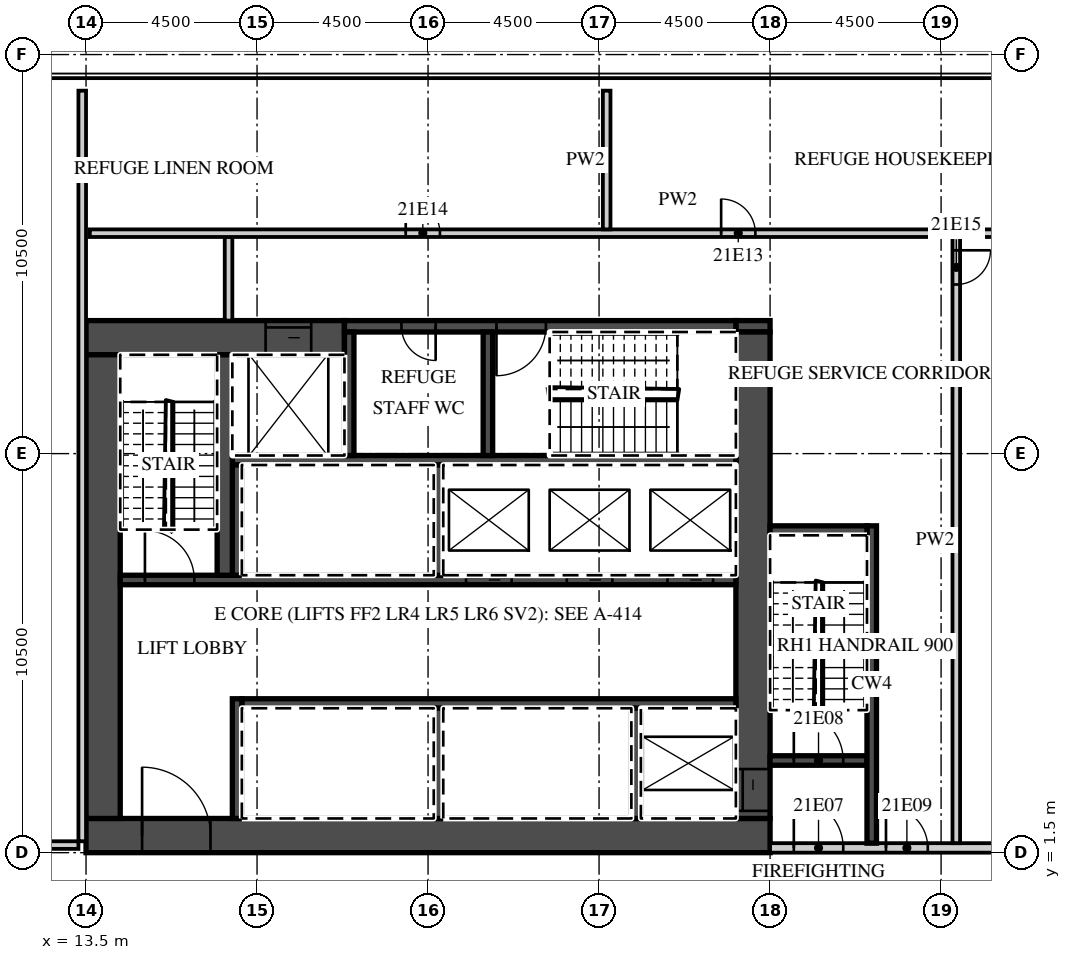
"""IFC4 building model, lengths in metres.
Left out: names, types, materials, properties, quantities, classifications, styles, units other than length and angle.
Written with IfcOpenShell. Run it as: python <this file> out.ifc"""

import sys

from ifc_helpers import new_model, si_unit, direction, frame, frame_2d, origin, place, context, subcontext, project, spatial, rectangle, extrude, element, fill, save


model = new_model("IFC4")
c1 = context("Model", 3, precision=1e-05, world=origin(), true_north=direction((0.0, 1.0)))
c2 = subcontext(c1, "Body", "Model", "MODEL_VIEW")
j1 = project(units=[si_unit("LENGTHUNIT", "METRE"), si_unit("PLANEANGLEUNIT", "RADIAN")], contexts=[c1])
p1 = place(None, origin())
s1 = spatial("IfcSite", under=j1, at=p1, CompositionType="ELEMENT")
p2 = place(p1, origin())
s2 = spatial("IfcBuilding", under=s1, at=p2, CompositionType="ELEMENT")
p3 = place(p2, frame((0.0, 0.0, 99.6)))
s3 = spatial("IfcBuildingStorey", under=s2, at=p3, CompositionType="ELEMENT", Elevation=99.6)
p4 = place(p3, frame((13.5, 1.95, 0.0), z_axis=(0.0, 0.0, 1.0), x_axis=(1.0, 0.0, 0.0)))
e1 = element("IfcWall", 1, at=p4, inside=s3, PredefinedType="SHEAR", context=c2, shape_type="SweptSolid", body=[
    extrude(rectangle(XDim=18.0, YDim=0.9, at=frame_2d((9.0, 0.0))), origin(), (0.0, 0.0, 1.0), 4.2),
])
p5 = place(p4, frame((1.475, 0.0, 0.0)))
e2 = element("IfcOpeningElement", 2, at=p5, cuts=e1, PredefinedType="OPENING", context=c2, shape_type="SweptSolid", body=[
    extrude(rectangle(XDim=1.8, YDim=2.1, at=frame_2d((0.9, 1.05))), frame((0.0, 0.46, 0.0), z_axis=(0.0, -1.0, 0.0), x_axis=(1.0, 0.0, 0.0)), (0.0, 0.0, 1.0), 0.92),
])
p6 = place(p3, frame((13.5, 15.05, 0.0), z_axis=(0.0, 0.0, 1.0), x_axis=(1.0, 0.0, 0.0)))
e3 = element("IfcWall", 3, at=p6, inside=s3, PredefinedType="SHEAR", context=c2, shape_type="SweptSolid", body=[
    extrude(rectangle(XDim=6.8, YDim=0.9, at=frame_2d((3.4, 0.0))), origin(), (0.0, 0.0, 1.0), 4.2),
])
p7 = place(p6, frame((4.725, 0.0, 0.0)))
e4 = element("IfcOpeningElement", 4, at=p7, cuts=e3, PredefinedType="OPENING", context=c2, shape_type="SweptSolid", body=[
    extrude(rectangle(XDim=1.2, YDim=2.1, at=frame_2d((0.6, 1.05))), frame((0.0, 0.46, 0.0), z_axis=(0.0, -1.0, 0.0), x_axis=(1.0, 0.0, 0.0)), (0.0, 0.0, 1.0), 0.92),
])
p8 = place(p3, frame((30.6, 15.35, 0.0), z_axis=(0.0, 0.0, 1.0), x_axis=(1.0, 0.0, 0.0)))
e5 = element("IfcWall", 5, at=p8, inside=s3, PredefinedType="SHEAR", context=c2, shape_type="SweptSolid", body=[
    extrude(rectangle(XDim=0.9, YDim=0.3, at=frame_2d((0.45, 0.0))), origin(), (0.0, 0.0, 1.0), 4.2),
])
p9 = place(p3, frame((20.3, 15.35, 0.0), z_axis=(0.0, 0.0, 1.0), x_axis=(1.0, 0.0, 0.0)))
e6 = element("IfcWall", 6, at=p9, inside=s3, PredefinedType="SHEAR", context=c2, shape_type="SweptSolid", body=[
    extrude(rectangle(XDim=10.3, YDim=0.3, at=frame_2d((5.15, 0.0))), origin(), (0.0, 0.0, 1.0), 4.2),
])
p10 = place(p9, frame((4.0, 0.0, 0.0)))
e7 = element("IfcOpeningElement", 7, at=p10, cuts=e6, PredefinedType="OPENING", context=c2, shape_type="SweptSolid", body=[
    extrude(rectangle(XDim=1.3, YDim=2.1, at=frame_2d((0.65, 1.05))), frame((0.0, 0.16, 0.0), z_axis=(0.0, -1.0, 0.0), x_axis=(1.0, 0.0, 0.0)), (0.0, 0.0, 1.0), 0.32),
])
p11 = place(p9, frame((1.5, 0.0, 0.0)))
e8 = element("IfcOpeningElement", 8, at=p11, cuts=e6, PredefinedType="OPENING", context=c2, shape_type="SweptSolid", body=[
    extrude(rectangle(XDim=0.9, YDim=2.1, at=frame_2d((0.45, 1.05))), frame((0.0, 0.16, 0.0), z_axis=(0.0, -1.0, 0.0), x_axis=(1.0, 0.0, 0.0)), (0.0, 0.0, 1.0), 0.32),
])
p12 = place(p3, frame((31.05, 2.4, 0.0), z_axis=(0.0, 0.0, 1.0), x_axis=(0.0, 1.0, 0.0)))
e9 = element("IfcWall", 9, at=p12, inside=s3, PredefinedType="SHEAR", context=c2, shape_type="SweptSolid", body=[
    extrude(rectangle(XDim=12.8, YDim=0.9, at=frame_2d((6.4, 0.0))), origin(), (0.0, 0.0, 1.0), 4.2),
])
p13 = place(p12, frame((0.2, 0.0, 0.0)))
e10 = element("IfcOpeningElement", 10, at=p13, cuts=e9, PredefinedType="OPENING", context=c2, shape_type="SweptSolid", body=[
    extrude(rectangle(XDim=1.1, YDim=2.1, at=frame_2d((0.55, 1.05))), frame((0.0, 0.46, 0.0), z_axis=(0.0, -1.0, 0.0), x_axis=(1.0, 0.0, 0.0)), (0.0, 0.0, 1.0), 0.92),
])
p14 = place(p3, frame((13.95, 2.4, 0.0), z_axis=(0.0, 0.0, 1.0), x_axis=(0.0, 1.0, 0.0)))
e11 = element("IfcWall", 11, at=p14, inside=s3, PredefinedType="SHEAR", context=c2, shape_type="SweptSolid", body=[
    extrude(rectangle(XDim=12.2, YDim=0.9, at=frame_2d((6.1, 0.0))), origin(), (0.0, 0.0, 1.0), 4.2),
])
p15 = place(p3, frame((17.6, 5.425, 0.0), z_axis=(0.0, 0.0, 1.0), x_axis=(1.0, 0.0, 0.0)))
e12 = element("IfcWall", 12, at=p15, inside=s3, PredefinedType="SHEAR", context=c2, shape_type="SweptSolid", body=[
    extrude(rectangle(XDim=13.0, YDim=0.25, at=frame_2d((6.5, 0.0))), origin(), (0.0, 0.0, 1.0), 4.2),
])
p16 = place(p3, frame((17.475, 2.4, 0.0), z_axis=(0.0, 0.0, 1.0), x_axis=(0.0, 1.0, 0.0)))
e13 = element("IfcWall", 13, at=p16, inside=s3, PredefinedType="SHEAR", context=c2, shape_type="SweptSolid", body=[
    extrude(rectangle(XDim=3.15, YDim=0.25, at=frame_2d((1.575, 0.0))), origin(), (0.0, 0.0, 1.0), 4.2),
])
for number, where, z_axis, x_axis in (
    (14, (27.975, 2.4, 0.0), (0.0, 0.0, 1.0), (0.0, 1.0, 0.0)),
    (15, (22.775, 2.4, 0.0), (0.0, 0.0, 1.0), (0.0, 1.0, 0.0)),
):
    element("IfcWall", number, at=place(p3, frame(where, z_axis=z_axis, x_axis=x_axis)), inside=s3, PredefinedType="SHEAR", context=c2, shape_type="SweptSolid", body=[
        extrude(rectangle(XDim=2.9, YDim=0.25, at=frame_2d((1.45, 0.0))), origin(), (0.0, 0.0, 1.0), 4.2),
    ])
p17 = place(p3, frame((14.4, 8.675, 0.0), z_axis=(0.0, 0.0, 1.0), x_axis=(1.0, 0.0, 0.0)))
e16 = element("IfcWall", 16, at=p17, inside=s3, PredefinedType="SHEAR", context=c2, shape_type="SweptSolid", body=[
    extrude(rectangle(XDim=16.2, YDim=0.25, at=frame_2d((8.1, 0.0))), origin(), (0.0, 0.0, 1.0), 4.2),
])
p18 = place(p17, frame((14.4, 0.0, 0.0)))
e17 = element("IfcOpeningElement", 17, at=p18, cuts=e16, PredefinedType="OPENING", context=c2, shape_type="SweptSolid", body=[
    extrude(rectangle(XDim=1.2, YDim=2.1, at=frame_2d((0.6, 1.05))), frame((0.0, 0.135, 0.0), z_axis=(0.0, -1.0, 0.0), x_axis=(1.0, 0.0, 0.0)), (0.0, 0.0, 1.0), 0.27),
])
p19 = place(p17, frame((11.75, 0.0, 0.0)))
e18 = element("IfcOpeningElement", 18, at=p19, cuts=e16, PredefinedType="OPENING", context=c2, shape_type="SweptSolid", body=[
    extrude(rectangle(XDim=1.2, YDim=2.1, at=frame_2d((0.6, 1.05))), frame((0.0, 0.135, 0.0), z_axis=(0.0, -1.0, 0.0), x_axis=(1.0, 0.0, 0.0)), (0.0, 0.0, 1.0), 0.27),
])
p20 = place(p17, frame((9.1, 0.0, 0.0)))
e19 = element("IfcOpeningElement", 19, at=p20, cuts=e16, PredefinedType="OPENING", context=c2, shape_type="SweptSolid", body=[
    extrude(rectangle(XDim=1.2, YDim=2.1, at=frame_2d((0.6, 1.05))), frame((0.0, 0.135, 0.0), z_axis=(0.0, -1.0, 0.0), x_axis=(1.0, 0.0, 0.0)), (0.0, 0.0, 1.0), 0.27),
])
p21 = place(p17, frame((0.65, 0.0, 0.0)))
e20 = element("IfcOpeningElement", 20, at=p21, cuts=e16, PredefinedType="OPENING", context=c2, shape_type="SweptSolid", body=[
    extrude(rectangle(XDim=1.3, YDim=2.1, at=frame_2d((0.65, 1.05))), frame((0.0, 0.135, 0.0), z_axis=(0.0, -1.0, 0.0), x_axis=(1.0, 0.0, 0.0)), (0.0, 0.0, 1.0), 0.27),
])
p22 = place(p3, frame((17.35, 11.825, 0.0), z_axis=(0.0, 0.0, 1.0), x_axis=(1.0, 0.0, 0.0)))
e21 = element("IfcWall", 21, at=p22, inside=s3, PredefinedType="SHEAR", context=c2, shape_type="SweptSolid", body=[
    extrude(rectangle(XDim=13.25, YDim=0.25, at=frame_2d((6.625, 0.0))), origin(), (0.0, 0.0, 1.0), 4.2),
])
for number, where, z_axis, x_axis in (
    (22, (17.475, 8.8, 0.0), (0.0, 0.0, 1.0), (0.0, 1.0, 0.0)),
    (23, (22.775, 8.8, 0.0), (0.0, 0.0, 1.0), (0.0, 1.0, 0.0)),
):
    element("IfcWall", number, at=place(p3, frame(where, z_axis=z_axis, x_axis=x_axis)), inside=s3, PredefinedType="SHEAR", context=c2, shape_type="SweptSolid", body=[
        extrude(rectangle(XDim=2.9, YDim=0.25, at=frame_2d((1.45, 0.0))), origin(), (0.0, 0.0, 1.0), 4.2),
    ])
p23 = place(p3, frame((17.15, 8.8, 0.0), z_axis=(0.0, 0.0, 1.0), x_axis=(0.0, 1.0, 0.0)))
e24 = element("IfcWall", 24, at=p23, inside=s3, PredefinedType="SHEAR", context=c2, shape_type="SweptSolid", body=[
    extrude(rectangle(XDim=5.8, YDim=0.4, at=frame_2d((2.9, 0.0))), origin(), (0.0, 0.0, 1.0), 4.2),
])
for number, where, z_axis, x_axis in (
    (25, (20.425, 11.95, 0.0), (0.0, 0.0, 1.0), (0.0, 1.0, 0.0)),
    (26, (24.075, 11.95, 0.0), (0.0, 0.0, 1.0), (0.0, 1.0, 0.0)),
):
    element("IfcWall", number, at=place(p3, frame(where, z_axis=z_axis, x_axis=x_axis)), inside=s3, PredefinedType="SHEAR", context=c2, shape_type="SweptSolid", body=[
        extrude(rectangle(XDim=3.25, YDim=0.25, at=frame_2d((1.625, 0.0))), origin(), (0.0, 0.0, 1.0), 4.2),
    ])
p24 = place(p3, frame((31.5, 1.625, 0.0), z_axis=(0.0, 0.0, 1.0), x_axis=(1.0, 0.0, 0.0)))
e27 = element("IfcWall", 27, at=p24, inside=s3, PredefinedType="PARTITIONING", context=c2, shape_type="SweptSolid", body=[
    extrude(rectangle(XDim=13.05, YDim=0.25, at=frame_2d((6.525, 0.0))), origin(), (0.0, 0.0, 1.0), 4.2),
])
p25 = place(p24, frame((0.625, 0.0, 0.0)))
e28 = element("IfcOpeningElement", 28, at=p25, cuts=e27, PredefinedType="OPENING", context=c2, shape_type="SweptSolid", body=[
    extrude(rectangle(XDim=1.3, YDim=2.1, at=frame_2d((0.65, 1.05))), frame((0.0, 0.135, 0.0), z_axis=(0.0, -1.0, 0.0), x_axis=(1.0, 0.0, 0.0)), (0.0, 0.0, 1.0), 0.27),
])
p26 = place(p24, frame((3.05, 0.0, 0.0)))
e29 = element("IfcOpeningElement", 29, at=p26, cuts=e27, PredefinedType="OPENING", context=c2, shape_type="SweptSolid", body=[
    extrude(rectangle(XDim=1.1, YDim=2.1, at=frame_2d((0.55, 1.05))), frame((0.0, 0.135, 0.0), z_axis=(0.0, -1.0, 0.0), x_axis=(1.0, 0.0, 0.0)), (0.0, 0.0, 1.0), 0.27),
])
p27 = place(p3, frame((31.5, 3.925, 0.0), z_axis=(0.0, 0.0, 1.0), x_axis=(1.0, 0.0, 0.0)))
e30 = element("IfcWall", 30, at=p27, inside=s3, PredefinedType="SHEAR", context=c2, shape_type="SweptSolid", body=[
    extrude(rectangle(XDim=2.55, YDim=0.25, at=frame_2d((1.275, 0.0))), origin(), (0.0, 0.0, 1.0), 4.2),
])
p28 = place(p27, frame((0.625, 0.0, 0.0)))
e31 = element("IfcOpeningElement", 31, at=p28, cuts=e30, PredefinedType="OPENING", context=c2, shape_type="SweptSolid", body=[
    extrude(rectangle(XDim=1.3, YDim=2.1, at=frame_2d((0.65, 1.05))), frame((0.0, 0.135, 0.0), z_axis=(0.0, -1.0, 0.0), x_axis=(1.0, 0.0, 0.0)), (0.0, 0.0, 1.0), 0.27),
])
p29 = place(p3, frame((34.175, 1.75, 0.0), z_axis=(0.0, 0.0, 1.0), x_axis=(0.0, 1.0, 0.0)))
e32 = element("IfcWall", 32, at=p29, inside=s3, PredefinedType="SHEAR", context=c2, shape_type="SweptSolid", body=[
    extrude(rectangle(XDim=8.35, YDim=0.25, at=frame_2d((4.175, 0.0))), origin(), (0.0, 0.0, 1.0), 4.2),
])
p30 = place(p3, frame((31.5, 9.975, 0.0), z_axis=(0.0, 0.0, 1.0), x_axis=(1.0, 0.0, 0.0)))
e33 = element("IfcWall", 33, at=p30, inside=s3, PredefinedType="SHEAR", context=c2, shape_type="SweptSolid", body=[
    extrude(rectangle(XDim=2.55, YDim=0.25, at=frame_2d((1.275, 0.0))), origin(), (0.0, 0.0, 1.0), 4.2),
])
p31 = place(p3, frame((17.25, 15.5, 0.0), z_axis=(0.0, 0.0, 1.0), x_axis=(0.0, 1.0, 0.0)))
e34 = element("IfcWall", 34, at=p31, inside=s3, PredefinedType="PARTITIONING", context=c2, shape_type="SweptSolid", body=[
    extrude(rectangle(XDim=2.2, YDim=0.2, at=frame_2d((1.1, 0.0))), origin(), (0.0, 0.0, 1.0), 4.2),
])
p32 = place(p3, frame((36.4, 1.75, 0.0), z_axis=(0.0, 0.0, 1.0), x_axis=(0.0, 1.0, 0.0)))
e35 = element("IfcWall", 35, at=p32, inside=s3, PredefinedType="PARTITIONING", context=c2, shape_type="SweptSolid", body=[
    extrude(rectangle(XDim=15.95, YDim=0.2, at=frame_2d((7.975, 0.0))), origin(), (0.0, 0.0, 1.0), 4.2),
])
p33 = place(p32, frame((14.7, 0.0, 0.0)))
e36 = element("IfcOpeningElement", 36, at=p33, cuts=e35, PredefinedType="OPENING", context=c2, shape_type="SweptSolid", body=[
    extrude(rectangle(XDim=0.9, YDim=2.1, at=frame_2d((0.45, 1.05))), frame((0.0, 0.11, 0.0), z_axis=(0.0, -1.0, 0.0), x_axis=(1.0, 0.0, 0.0)), (0.0, 0.0, 1.0), 0.22),
])
p34 = place(p3, frame((13.6, 17.8, 0.0), z_axis=(0.0, 0.0, 1.0), x_axis=(1.0, 0.0, 0.0)))
e37 = element("IfcWall", 37, at=p34, inside=s3, PredefinedType="PARTITIONING", context=c2, shape_type="SweptSolid", body=[
    extrude(rectangle(XDim=30.95, YDim=0.2, at=frame_2d((15.475, 0.0))), origin(), (0.0, 0.0, 1.0), 4.2),
])
p35 = place(p34, frame((16.613, 0.0, 0.0)))
e38 = element("IfcOpeningElement", 38, at=p35, cuts=e37, PredefinedType="OPENING", context=c2, shape_type="SweptSolid", body=[
    extrude(rectangle(XDim=0.9, YDim=2.1, at=frame_2d((0.45, 1.05))), frame((0.0, 0.11, 0.0), z_axis=(0.0, -1.0, 0.0), x_axis=(1.0, 0.0, 0.0)), (0.0, 0.0, 1.0), 0.22),
])
p36 = place(p34, frame((8.312, 0.0, 0.0)))
e39 = element("IfcOpeningElement", 39, at=p36, cuts=e37, PredefinedType="OPENING", context=c2, shape_type="SweptSolid", body=[
    extrude(rectangle(XDim=0.9, YDim=2.1, at=frame_2d((0.45, 1.05))), frame((0.0, 0.11, 0.0), z_axis=(0.0, -1.0, 0.0), x_axis=(1.0, 0.0, 0.0)), (0.0, 0.0, 1.0), 0.22),
])
p37 = place(p3, frame((27.2, 17.9, 0.0), z_axis=(0.0, 0.0, 1.0), x_axis=(0.0, 1.0, 0.0)))
e40 = element("IfcWall", 40, at=p37, inside=s3, PredefinedType="PARTITIONING", context=c2, shape_type="SweptSolid", body=[
    extrude(rectangle(XDim=3.65, YDim=0.2, at=frame_2d((1.825, 0.0))), origin(), (0.0, 0.0, 1.0), 4.2),
])
p38 = place(p3, frame((-44.55, 1.7, 0.0), z_axis=(0.0, 0.0, 1.0), x_axis=(1.0, 0.0, 0.0)))
e41 = element("IfcWall", 41, at=p38, inside=s3, PredefinedType="PARTITIONING", context=c2, shape_type="SweptSolid", body=[
    extrude(rectangle(XDim=57.85, YDim=0.2, at=frame_2d((28.925, 0.0))), origin(), (0.0, 0.0, 1.0), 4.2),
])
p39 = place(p38, frame((51.4, 0.0, 0.0)))
e42 = element("IfcOpeningElement", 42, at=p39, cuts=e41, PredefinedType="OPENING", context=c2, shape_type="SweptSolid", body=[
    extrude(rectangle(XDim=1.8, YDim=2.1, at=frame_2d((0.9, 1.05))), frame((0.0, 0.11, 0.0), z_axis=(0.0, -1.0, 0.0), x_axis=(1.0, 0.0, 0.0)), (0.0, 0.0, 1.0), 0.22),
])
p40 = place(p38, frame((45.05, 0.0, 0.0)))
e43 = element("IfcOpeningElement", 43, at=p40, cuts=e41, PredefinedType="OPENING", context=c2, shape_type="SweptSolid", body=[
    extrude(rectangle(XDim=1.0, YDim=2.1, at=frame_2d((0.5, 1.05))), frame((0.0, 0.11, 0.0), z_axis=(0.0, -1.0, 0.0), x_axis=(1.0, 0.0, 0.0)), (0.0, 0.0, 1.0), 0.22),
])
p41 = place(p38, frame((38.475, 0.0, 0.0)))
e44 = element("IfcOpeningElement", 44, at=p41, cuts=e41, PredefinedType="OPENING", context=c2, shape_type="SweptSolid", body=[
    extrude(rectangle(XDim=1.2, YDim=2.1, at=frame_2d((0.6, 1.05))), frame((0.0, 0.11, 0.0), z_axis=(0.0, -1.0, 0.0), x_axis=(1.0, 0.0, 0.0)), (0.0, 0.0, 1.0), 0.22),
])
p42 = place(p38, frame((24.41, 0.0, 0.0)))
e45 = element("IfcOpeningElement", 45, at=p42, cuts=e41, PredefinedType="OPENING", context=c2, shape_type="SweptSolid", body=[
    extrude(rectangle(XDim=1.8, YDim=2.1, at=frame_2d((0.9, 1.05))), frame((0.0, 0.11, 0.0), z_axis=(0.0, -1.0, 0.0), x_axis=(1.0, 0.0, 0.0)), (0.0, 0.0, 1.0), 0.22),
])
p43 = place(p38, frame((17.89, 0.0, 0.0)))
e46 = element("IfcOpeningElement", 46, at=p43, cuts=e41, PredefinedType="OPENING", context=c2, shape_type="SweptSolid", body=[
    extrude(rectangle(XDim=1.8, YDim=2.1, at=frame_2d((0.9, 1.05))), frame((0.0, 0.11, 0.0), z_axis=(0.0, -1.0, 0.0), x_axis=(1.0, 0.0, 0.0)), (0.0, 0.0, 1.0), 0.22),
])
p44 = place(p38, frame((5.975, 0.0, 0.0)))
e47 = element("IfcOpeningElement", 47, at=p44, cuts=e41, PredefinedType="OPENING", context=c2, shape_type="SweptSolid", body=[
    extrude(rectangle(XDim=1.0, YDim=2.1, at=frame_2d((0.5, 1.05))), frame((0.0, 0.11, 0.0), z_axis=(0.0, -1.0, 0.0), x_axis=(1.0, 0.0, 0.0)), (0.0, 0.0, 1.0), 0.22),
])
p45 = place(p3, frame((13.4, 1.8, 0.0), z_axis=(0.0, 0.0, 1.0), x_axis=(0.0, 1.0, 0.0)))
e48 = element("IfcWall", 48, at=p45, inside=s3, PredefinedType="PARTITIONING", context=c2, shape_type="SweptSolid", body=[
    extrude(rectangle(XDim=19.75, YDim=0.2, at=frame_2d((9.875, 0.0))), origin(), (0.0, 0.0, 1.0), 4.2),
])
p46 = place(p18, origin())
e49 = element("IfcDoor", 49, at=p46, inside=s3, OperationType="SLIDING_TO_LEFT", PredefinedType="DOOR", context=c2, shape_type="SweptSolid", body=[
    extrude(rectangle(XDim=1.2, YDim=2.1, at=frame_2d((0.6, 1.05))), frame((0.0, 0.025, 0.0), z_axis=(0.0, -1.0, 0.0), x_axis=(1.0, 0.0, 0.0)), (0.0, 0.0, 1.0), 0.05),
])
fill(e17, e49)
p47 = place(p19, origin())
e50 = element("IfcDoor", 50, at=p47, inside=s3, OperationType="SLIDING_TO_RIGHT", PredefinedType="DOOR", context=c2, shape_type="SweptSolid", body=[
    extrude(rectangle(XDim=1.2, YDim=2.1, at=frame_2d((0.6, 1.05))), frame((0.0, 0.025, 0.0), z_axis=(0.0, -1.0, 0.0), x_axis=(1.0, 0.0, 0.0)), (0.0, 0.0, 1.0), 0.05),
])
fill(e18, e50)
p48 = place(p20, origin())
e51 = element("IfcDoor", 51, at=p48, inside=s3, OperationType="SLIDING_TO_RIGHT", PredefinedType="DOOR", context=c2, shape_type="SweptSolid", body=[
    extrude(rectangle(XDim=1.2, YDim=2.1, at=frame_2d((0.6, 1.05))), frame((0.0, 0.025, 0.0), z_axis=(0.0, -1.0, 0.0), x_axis=(1.0, 0.0, 0.0)), (0.0, 0.0, 1.0), 0.05),
])
fill(e19, e51)
p49 = place(p7, origin())
e52 = element("IfcDoor", 52, at=p49, inside=s3, OperationType="SLIDING_TO_LEFT", PredefinedType="DOOR", context=c2, shape_type="SweptSolid", body=[
    extrude(rectangle(XDim=1.2, YDim=2.1, at=frame_2d((0.6, 1.05))), frame((0.0, 0.025, 0.0), z_axis=(0.0, -1.0, 0.0), x_axis=(1.0, 0.0, 0.0)), (0.0, 0.0, 1.0), 0.05),
])
fill(e4, e52)
p50 = place(p13, origin())
e53 = element("IfcDoor", 53, at=p50, inside=s3, OperationType="SLIDING_TO_LEFT", PredefinedType="DOOR", context=c2, shape_type="SweptSolid", body=[
    extrude(rectangle(XDim=1.1, YDim=2.1, at=frame_2d((0.55, 1.05))), frame((0.0, 0.025, 0.0), z_axis=(0.0, -1.0, 0.0), x_axis=(1.0, 0.0, 0.0)), (0.0, 0.0, 1.0), 0.05),
])
fill(e10, e53)
p51 = place(p5, origin())
e54 = element("IfcDoor", 54, at=p51, inside=s3, OperationType="DOUBLE_DOOR_DOUBLE_SWING", PredefinedType="DOOR", context=c2, shape_type="SweptSolid", body=[
    extrude(rectangle(XDim=1.8, YDim=2.1, at=frame_2d((0.9, 1.05))), frame((0.0, 0.025, 0.0), z_axis=(0.0, -1.0, 0.0), x_axis=(1.0, 0.0, 0.0)), (0.0, 0.0, 1.0), 0.05),
])
fill(e2, e54)
p52 = place(p25, origin())
e55 = element("IfcDoor", 55, at=p52, inside=s3, OperationType="SINGLE_SWING_LEFT", PredefinedType="DOOR", context=c2, shape_type="SweptSolid", body=[
    extrude(rectangle(XDim=1.3, YDim=2.1, at=frame_2d((0.65, 1.05))), frame((0.0, 0.025, 0.0), z_axis=(0.0, -1.0, 0.0), x_axis=(1.0, 0.0, 0.0)), (0.0, 0.0, 1.0), 0.05),
])
fill(e28, e55)
p53 = place(p28, origin())
e56 = element("IfcDoor", 56, at=p53, inside=s3, OperationType="SINGLE_SWING_LEFT", PredefinedType="DOOR", context=c2, shape_type="SweptSolid", body=[
    extrude(rectangle(XDim=1.3, YDim=2.1, at=frame_2d((0.65, 1.05))), frame((0.0, 0.025, 0.0), z_axis=(0.0, -1.0, 0.0), x_axis=(1.0, 0.0, 0.0)), (0.0, 0.0, 1.0), 0.05),
])
fill(e31, e56)
p54 = place(p26, origin())
e57 = element("IfcDoor", 57, at=p54, inside=s3, OperationType="SINGLE_SWING_LEFT", PredefinedType="DOOR", context=c2, shape_type="SweptSolid", body=[
    extrude(rectangle(XDim=1.1, YDim=2.1, at=frame_2d((0.55, 1.05))), frame((0.0, 0.025, 0.0), z_axis=(0.0, -1.0, 0.0), x_axis=(1.0, 0.0, 0.0)), (0.0, 0.0, 1.0), 0.05),
])
fill(e29, e57)
p55 = place(p21, origin())
e58 = element("IfcDoor", 58, at=p55, inside=s3, OperationType="SINGLE_SWING_LEFT", PredefinedType="DOOR", context=c2, shape_type="SweptSolid", body=[
    extrude(rectangle(XDim=1.3, YDim=2.1, at=frame_2d((0.65, 1.05))), frame((0.0, 0.025, 0.0), z_axis=(0.0, -1.0, 0.0), x_axis=(1.0, 0.0, 0.0)), (0.0, 0.0, 1.0), 0.05),
])
fill(e20, e58)
p56 = place(p10, origin())
e59 = element("IfcDoor", 59, at=p56, inside=s3, OperationType="SINGLE_SWING_LEFT", PredefinedType="DOOR", context=c2, shape_type="SweptSolid", body=[
    extrude(rectangle(XDim=1.3, YDim=2.1, at=frame_2d((0.65, 1.05))), frame((0.0, 0.025, 0.0), z_axis=(0.0, -1.0, 0.0), x_axis=(1.0, 0.0, 0.0)), (0.0, 0.0, 1.0), 0.05),
])
fill(e7, e59)
p57 = place(p11, origin())
e60 = element("IfcDoor", 60, at=p57, inside=s3, OperationType="SINGLE_SWING_RIGHT", PredefinedType="DOOR", context=c2, shape_type="SweptSolid", body=[
    extrude(rectangle(XDim=0.9, YDim=2.1, at=frame_2d((0.45, 1.05))), frame((0.0, 0.025, 0.0), z_axis=(0.0, -1.0, 0.0), x_axis=(1.0, 0.0, 0.0)), (0.0, 0.0, 1.0), 0.05),
])
fill(e8, e60)
p58 = place(p35, origin())
e61 = element("IfcDoor", 61, at=p58, inside=s3, OperationType="SINGLE_SWING_LEFT", PredefinedType="DOOR", context=c2, shape_type="SweptSolid", body=[
    extrude(rectangle(XDim=0.9, YDim=2.1, at=frame_2d((0.45, 1.05))), frame((0.0, 0.025, 0.0), z_axis=(0.0, -1.0, 0.0), x_axis=(1.0, 0.0, 0.0)), (0.0, 0.0, 1.0), 0.05),
])
fill(e38, e61)
p59 = place(p36, origin())
e62 = element("IfcDoor", 62, at=p59, inside=s3, OperationType="SINGLE_SWING_LEFT", PredefinedType="DOOR", context=c2, shape_type="SweptSolid", body=[
    extrude(rectangle(XDim=0.9, YDim=2.1, at=frame_2d((0.45, 1.05))), frame((0.0, 0.025, 0.0), z_axis=(0.0, -1.0, 0.0), x_axis=(1.0, 0.0, 0.0)), (0.0, 0.0, 1.0), 0.05),
])
fill(e39, e62)
p60 = place(p33, origin())
e63 = element("IfcDoor", 63, at=p60, inside=s3, OperationType="SINGLE_SWING_RIGHT", PredefinedType="DOOR", context=c2, shape_type="SweptSolid", body=[
    extrude(rectangle(XDim=0.9, YDim=2.1, at=frame_2d((0.45, 1.05))), frame((0.0, 0.025, 0.0), z_axis=(0.0, -1.0, 0.0), x_axis=(1.0, 0.0, 0.0)), (0.0, 0.0, 1.0), 0.05),
])
fill(e36, e63)
save(model, sys.argv[1])
